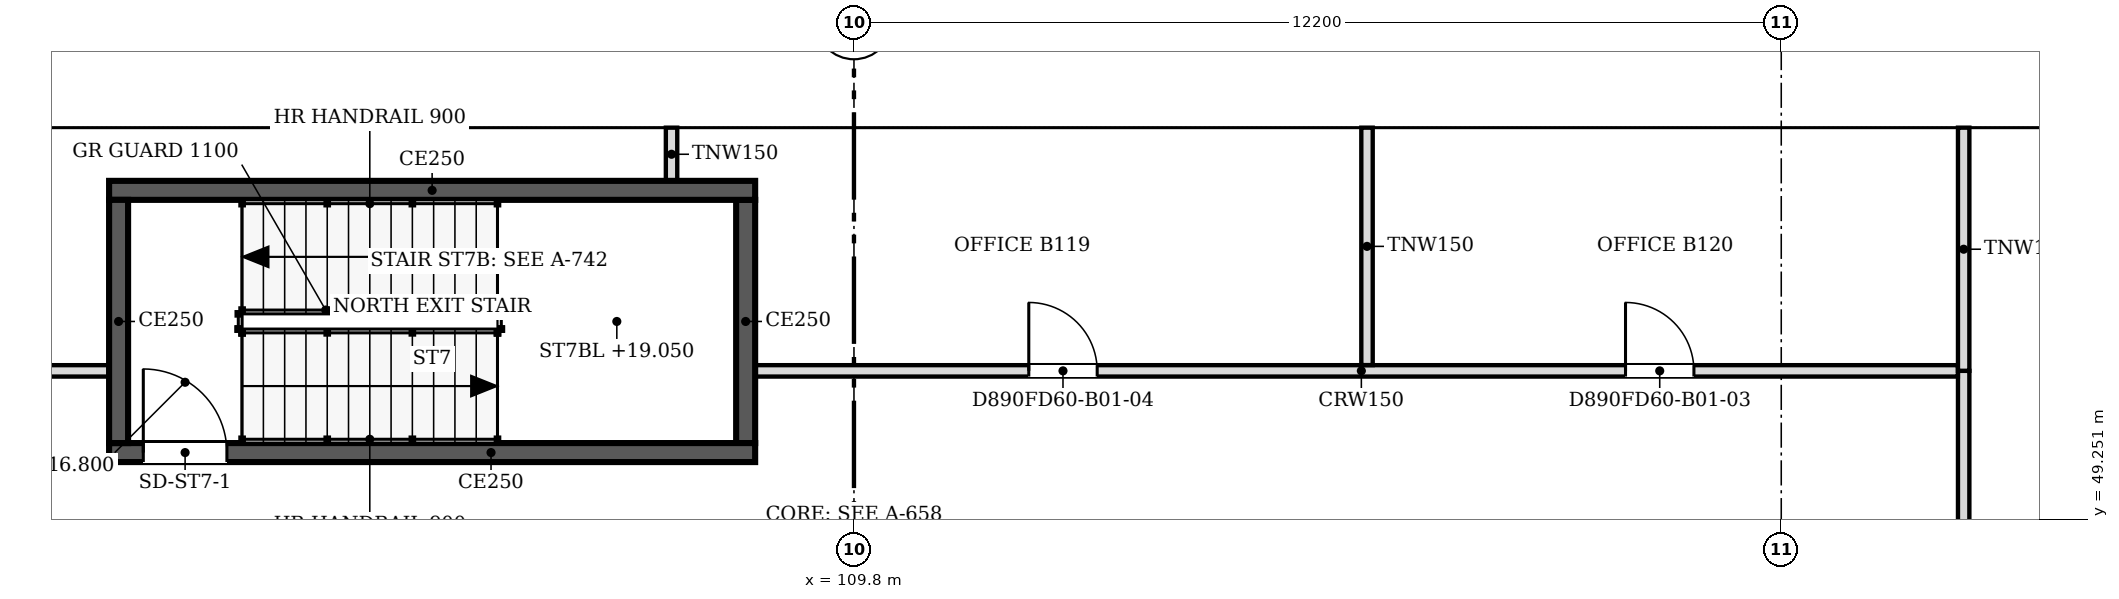
"""IFC4 building model, lengths in metres.
Left out: names, types, materials, properties, quantities, classifications, styles, units other than length and angle.
Written with IfcOpenShell. Run it as: python <this file> out.ifc"""

import sys

from ifc_helpers import new_model, si_unit, direction, frame, frame_2d, origin, place, context, subcontext, project, spatial, polyline, rectangle, outline, extrude, faceted_brep, source, transform, mapped, element, fill, save


model = new_model("IFC4")
c1 = context("Model", 3, precision=1e-05, world=origin(), true_north=direction((0.0, 1.0)))
c2 = subcontext(c1, "Body", "Model", "MODEL_VIEW")
j1 = project(units=[si_unit("LENGTHUNIT", "METRE"), si_unit("PLANEANGLEUNIT", "RADIAN")], contexts=[c1])
p1 = place(None, origin())
s1 = spatial("IfcSite", under=j1, at=p1, CompositionType="ELEMENT")
p2 = place(p1, origin())
s2 = spatial("IfcBuilding", under=s1, at=p2, CompositionType="ELEMENT")
p3 = place(p2, frame((0.0, 0.0, 16.8)))
s3 = spatial("IfcBuildingStorey", under=s2, at=p3, CompositionType="ELEMENT", Elevation=16.8)
m1 = source(origin(), c2, "Body", "Brep", [
    faceted_brep([(3.05, -0.25, 0.0), (0.047, -0.25, 4.5), (0.0, -0.25, 4.429), (0.0, -0.25, 0.0), (0.093, 0.25, 4.43), (3.05, 0.25, 0.0), (0.093, 0.25, 0.0), (0.047, 0.0, 4.5)], [[[0, 1, 2, 3]], [[4, 5, 6]], [[5, 4, 7, 1, 0]], [[2, 1, 7]], [[6, 5, 0, 3]], [[6, 3, 2, 7, 4]]]),
])
p4 = place(p3, frame((128.1, 54.65, 0.0), z_axis=(0.0, 0.0, 1.0), x_axis=(-1.0, 0.0, 0.0)))
e1 = element("IfcWall", 1, at=p4, inside=s3, PredefinedType="SOLIDWALL", context=c2, shape_type="MappedRepresentation", body=[
    mapped(m1, transform((0.0, 0.0, 0.0), scale=1.0)),
])
m2 = source(origin(), c2, "Body", "SweptSolid", [
    extrude(outline(polyline([(2.583, 0.25), (0.247, 3.75), (0.247, 0.25), (2.583, 0.25)])), frame((0.0, 0.26, 0.0), z_axis=(0.0, -1.0, 0.0), x_axis=(1.0, 0.0, 0.0)), (0.0, 0.0, 1.0), 0.52),
])
p5 = place(p4, origin())
e2 = element("IfcOpeningElement", 2, at=p5, cuts=e1, PredefinedType="OPENING", context=c2, shape_type="MappedRepresentation", body=[
    mapped(m2, transform((0.0, 0.0, 0.0), scale=1.0)),
])
m3 = source(origin(), c2, "Body", "SweptSolid", [
    extrude(outline(polyline([(6.1, 0.0), (3.05, 4.5), (0.0, 0.0), (6.1, 0.0)])), frame((0.0, 0.25, 0.0), z_axis=(0.0, -1.0, 0.0), x_axis=(1.0, 0.0, 0.0)), (0.0, 0.0, 1.0), 0.5),
])
p6 = place(p3, frame((125.05, 54.65, 0.0), z_axis=(0.0, 0.0, 1.0), x_axis=(-1.0, 0.0, 0.0)))
e3 = element("IfcWall", 3, at=p6, inside=s3, PredefinedType="SOLIDWALL", context=c2, shape_type="MappedRepresentation", body=[
    mapped(m3, transform((0.0, 0.0, 0.0), scale=1.0)),
])
m4 = source(origin(), c2, "Body", "SweptSolid", [
    extrude(outline(polyline([(5.629, 0.25), (3.05, 4.054), (0.471, 0.25), (5.629, 0.25)])), frame((0.0, 0.26, 0.0), z_axis=(0.0, -1.0, 0.0), x_axis=(1.0, 0.0, 0.0)), (0.0, 0.0, 1.0), 0.52),
])
p7 = place(p6, origin())
e4 = element("IfcOpeningElement", 4, at=p7, cuts=e3, PredefinedType="OPENING", context=c2, shape_type="MappedRepresentation", body=[
    mapped(m4, transform((0.0, 0.0, 0.0), scale=1.0)),
])
m5 = source(origin(), c2, "Body", "Brep", [
    faceted_brep([(6.1, -0.25, 0.0), (3.05, -0.25, 4.5), (0.0, -0.25, 0.0), (6.1, -0.25, 0.0), (0.0, 0.25, 0.0), (3.05, 0.25, 4.5), (6.1, 0.25, 0.0), (6.1, 0.25, 0.0)], [[[0, 1, 2, 3]], [[4, 5, 6, 7]], [[6, 5, 1, 0]], [[5, 4, 2, 1]], [[4, 7, 3, 2]], [[3, 7, 6, 0]]]),
])
p8 = place(p3, frame((118.95, 54.65, 0.0), z_axis=(0.0, 0.0, 1.0), x_axis=(-1.0, 0.0, 0.0)))
e5 = element("IfcWall", 5, at=p8, inside=s3, PredefinedType="SOLIDWALL", context=c2, shape_type="MappedRepresentation", body=[
    mapped(m5, transform((0.0, 0.0, 0.0), scale=1.0)),
])
p9 = place(p8, origin())
e6 = element("IfcOpeningElement", 6, at=p9, cuts=e5, PredefinedType="OPENING", context=c2, shape_type="MappedRepresentation", body=[
    mapped(m4, transform((0.0, 0.0, 0.0), scale=1.0)),
])
p10 = place(p3, frame((112.85, 54.65, 0.0), z_axis=(0.0, 0.0, 1.0), x_axis=(-1.0, 0.0, 0.0)))
e7 = element("IfcWall", 7, at=p10, inside=s3, PredefinedType="SOLIDWALL", context=c2, shape_type="MappedRepresentation", body=[
    mapped(m3, transform((0.0, 0.0, 0.0), scale=1.0)),
])
p11 = place(p10, origin())
e8 = element("IfcOpeningElement", 8, at=p11, cuts=e7, PredefinedType="OPENING", context=c2, shape_type="MappedRepresentation", body=[
    mapped(m4, transform((0.0, 0.0, 0.0), scale=1.0)),
])
p12 = place(p3, frame((106.75, 54.65, 0.0), z_axis=(0.0, 0.0, 1.0), x_axis=(-1.0, 0.0, 0.0)))
e9 = element("IfcWall", 9, at=p12, inside=s3, PredefinedType="SOLIDWALL", context=c2, shape_type="MappedRepresentation", body=[
    mapped(m3, transform((0.0, 0.0, 0.0), scale=1.0)),
])
p13 = place(p12, origin())
e10 = element("IfcOpeningElement", 10, at=p13, cuts=e9, PredefinedType="OPENING", context=c2, shape_type="MappedRepresentation", body=[
    mapped(m4, transform((0.0, 0.0, 0.0), scale=1.0)),
])
p14 = place(p3, frame((100.65, 54.65, 0.0), z_axis=(0.0, 0.0, 1.0), x_axis=(-1.0, 0.0, 0.0)))
e11 = element("IfcWall", 11, at=p14, inside=s3, PredefinedType="SOLIDWALL", context=c2, shape_type="MappedRepresentation", body=[
    mapped(m5, transform((0.0, 0.0, 0.0), scale=1.0)),
])
p15 = place(p14, origin())
e12 = element("IfcOpeningElement", 12, at=p15, cuts=e11, PredefinedType="OPENING", context=c2, shape_type="MappedRepresentation", body=[
    mapped(m4, transform((0.0, 0.0, 0.0), scale=1.0)),
])
p16 = place(p2, frame((0.0, 0.0, 21.3)))
s4 = spatial("IfcBuildingStorey", under=s2, at=p16, CompositionType="ELEMENT", Elevation=21.3)
m6 = source(origin(), c2, "Body", "Brep", [
    faceted_brep([(3.003, -0.25, 0.0), (6.053, -0.25, 4.5), (3.003, -0.25, 9.0), (0.0, -0.25, 4.5), (0.047, 0.25, 4.57), (3.003, 0.25, 9.0), (6.053, 0.25, 4.5), (3.003, 0.25, 0.0), (0.047, 0.25, 4.43), (0.0, 0.0, 4.5)], [[[0, 1, 2, 3]], [[4, 5, 6, 7, 8]], [[7, 6, 1, 0]], [[6, 5, 2, 1]], [[5, 4, 9, 3, 2]], [[8, 7, 0, 3, 9]], [[8, 9, 4]]]),
])
p17 = place(p16, frame((128.053, 54.65, -4.5), z_axis=(0.0, 0.0, 1.0), x_axis=(-1.0, 0.0, 0.0)))
e13 = element("IfcWall", 13, at=p17, inside=s4, PredefinedType="SOLIDWALL", context=c2, shape_type="MappedRepresentation", body=[
    mapped(m6, transform((0.0, 0.0, 0.0), scale=1.0)),
])
m7 = source(origin(), c2, "Body", "SweptSolid", [
    extrude(outline(polyline([(3.005, 0.448), (5.751, 4.5), (3.005, 8.552), (0.301, 4.5), (3.005, 0.448)])), frame((0.0, 0.26, 0.0), z_axis=(0.0, -1.0, 0.0), x_axis=(1.0, 0.0, 0.0)), (0.0, 0.0, 1.0), 0.52),
])
p18 = place(p17, origin())
e14 = element("IfcOpeningElement", 14, at=p18, cuts=e13, PredefinedType="OPENING", context=c2, shape_type="MappedRepresentation", body=[
    mapped(m7, transform((0.0, 0.0, 0.0), scale=1.0)),
])
m8 = source(origin(), c2, "Body", "SweptSolid", [
    extrude(outline(polyline([(3.05, 0.0), (6.1, 4.5), (3.05, 9.0), (0.0, 4.5), (3.05, 0.0)])), frame((0.0, 0.25, 0.0), z_axis=(0.0, -1.0, 0.0), x_axis=(1.0, 0.0, 0.0)), (0.0, 0.0, 1.0), 0.5),
])
p19 = place(p16, frame((122.0, 54.65, -4.5), z_axis=(0.0, 0.0, 1.0), x_axis=(-1.0, 0.0, 0.0)))
e15 = element("IfcWall", 15, at=p19, inside=s4, PredefinedType="SOLIDWALL", context=c2, shape_type="MappedRepresentation", body=[
    mapped(m8, transform((0.0, 0.0, 0.0), scale=1.0)),
])
m9 = source(origin(), c2, "Body", "SweptSolid", [
    extrude(outline(polyline([(3.05, 0.446), (5.798, 4.5), (3.05, 8.554), (0.302, 4.5), (3.05, 0.446)])), frame((0.0, 0.26, 0.0), z_axis=(0.0, -1.0, 0.0), x_axis=(1.0, 0.0, 0.0)), (0.0, 0.0, 1.0), 0.52),
])
p20 = place(p19, origin())
e16 = element("IfcOpeningElement", 16, at=p20, cuts=e15, PredefinedType="OPENING", context=c2, shape_type="MappedRepresentation", body=[
    mapped(m9, transform((0.0, 0.0, 0.0), scale=1.0)),
])
m10 = source(origin(), c2, "Body", "Brep", [
    faceted_brep([(3.05, -0.25, 0.0), (6.1, -0.25, 4.5), (6.1, -0.25, 4.5), (3.05, -0.25, 9.0), (0.0, -0.25, 4.5), (0.0, 0.25, 4.5), (3.05, 0.25, 9.0), (6.1, 0.25, 4.5), (6.1, 0.25, 4.5), (3.05, 0.25, 0.0)], [[[0, 1, 2, 3, 4]], [[5, 6, 7, 8, 9]], [[9, 8, 1, 0]], [[7, 6, 3, 2]], [[6, 5, 4, 3]], [[5, 9, 0, 4]], [[1, 8, 7, 2]]]),
])
p21 = place(p16, frame((115.9, 54.65, -4.5), z_axis=(0.0, 0.0, 1.0), x_axis=(-1.0, 0.0, 0.0)))
e17 = element("IfcWall", 17, at=p21, inside=s4, PredefinedType="SOLIDWALL", context=c2, shape_type="MappedRepresentation", body=[
    mapped(m10, transform((0.0, 0.0, 0.0), scale=1.0)),
])
p22 = place(p21, origin())
e18 = element("IfcOpeningElement", 18, at=p22, cuts=e17, PredefinedType="OPENING", context=c2, shape_type="MappedRepresentation", body=[
    mapped(m9, transform((0.0, 0.0, 0.0), scale=1.0)),
])
p23 = place(p16, frame((109.8, 54.65, -4.5), z_axis=(0.0, 0.0, 1.0), x_axis=(-1.0, 0.0, 0.0)))
e19 = element("IfcWall", 19, at=p23, inside=s4, PredefinedType="SOLIDWALL", context=c2, shape_type="MappedRepresentation", body=[
    mapped(m8, transform((0.0, 0.0, 0.0), scale=1.0)),
])
p24 = place(p23, origin())
e20 = element("IfcOpeningElement", 20, at=p24, cuts=e19, PredefinedType="OPENING", context=c2, shape_type="MappedRepresentation", body=[
    mapped(m9, transform((0.0, 0.0, 0.0), scale=1.0)),
])
p25 = place(p16, frame((103.7, 54.65, -4.5), z_axis=(0.0, 0.0, 1.0), x_axis=(-1.0, 0.0, 0.0)))
e21 = element("IfcWall", 21, at=p25, inside=s4, PredefinedType="SOLIDWALL", context=c2, shape_type="MappedRepresentation", body=[
    mapped(m10, transform((0.0, 0.0, 0.0), scale=1.0)),
])
p26 = place(p25, origin())
e22 = element("IfcOpeningElement", 22, at=p26, cuts=e21, PredefinedType="OPENING", context=c2, shape_type="MappedRepresentation", body=[
    mapped(m9, transform((0.0, 0.0, 0.0), scale=1.0)),
])
p27 = place(p3, frame((108.5, 50.125, 0.0), z_axis=(0.0, 0.0, 1.0), x_axis=(-1.0, 0.0, 0.0)))
e23 = element("IfcWall", 23, at=p27, inside=s3, PredefinedType="SOLIDWALL", context=c2, shape_type="SweptSolid", body=[
    extrude(rectangle(XDim=8.5, YDim=0.25, at=frame_2d((4.25, 0.0))), origin(), (0.0, 0.0, 1.0), 4.5),
])
m11 = source(origin(), c2, "Body", "SweptSolid", [
    extrude(rectangle(XDim=1.1, YDim=2.1, at=frame_2d((0.55, 1.05))), frame((0.0, 0.135, 0.0), z_axis=(0.0, -1.0, 0.0), x_axis=(1.0, 0.0, 0.0)), (0.0, 0.0, 1.0), 0.27),
])
p28 = place(p27, frame((6.95, 0.0, 0.0)))
e24 = element("IfcOpeningElement", 24, at=p28, cuts=e23, PredefinedType="OPENING", context=c2, shape_type="MappedRepresentation", body=[
    mapped(m11, transform((0.0, 0.0, 0.0), scale=1.0)),
])
p29 = place(p3, frame((100.125, 50.25, 0.0), z_axis=(0.0, 0.0, 1.0), x_axis=(0.0, 1.0, 0.0)))
e25 = element("IfcWall", 25, at=p29, inside=s3, PredefinedType="SOLIDWALL", context=c2, shape_type="SweptSolid", body=[
    extrude(rectangle(XDim=3.2, YDim=0.25, at=frame_2d((1.6, 0.0))), origin(), (0.0, 0.0, 1.0), 4.5),
])
p30 = place(p3, frame((100.0, 53.575, 0.0), z_axis=(0.0, 0.0, 1.0), x_axis=(1.0, 0.0, 0.0)))
e26 = element("IfcWall", 26, at=p30, inside=s3, PredefinedType="SOLIDWALL", context=c2, shape_type="SweptSolid", body=[
    extrude(rectangle(XDim=8.5, YDim=0.25, at=frame_2d((4.25, 0.0))), origin(), (0.0, 0.0, 1.0), 4.5),
])
p31 = place(p3, frame((108.375, 53.45, 0.0), z_axis=(0.0, 0.0, 1.0), x_axis=(0.0, -1.0, 0.0)))
e27 = element("IfcWall", 27, at=p31, inside=s3, PredefinedType="SOLIDWALL", context=c2, shape_type="SweptSolid", body=[
    extrude(rectangle(XDim=3.2, YDim=0.25, at=frame_2d((1.6, 0.0))), origin(), (0.0, 0.0, 1.0), 4.5),
])
p32 = place(p3, frame((124.4, 51.2, 0.0), z_axis=(0.0, 0.0, 1.0), x_axis=(0.0, -1.0, 0.0)))
e28 = element("IfcWall", 28, at=p32, inside=s3, PredefinedType="PARTITIONING", context=c2, shape_type="SweptSolid", body=[
    extrude(rectangle(XDim=14.6, YDim=0.15, at=frame_2d((7.3, 0.0))), origin(), (0.0, 0.0, 1.0), 3.415),
])
m12 = source(origin(), c2, "Body", "SweptSolid", [
    extrude(rectangle(XDim=0.9, YDim=2.1, at=frame_2d((0.45, 1.05))), frame((0.0, 0.085, 0.0), z_axis=(0.0, -1.0, 0.0), x_axis=(1.0, 0.0, 0.0)), (0.0, 0.0, 1.0), 0.17),
])
p33 = place(p32, frame((3.9, 0.0, 0.0)))
e29 = element("IfcOpeningElement", 29, at=p33, cuts=e28, PredefinedType="OPENING", context=c2, shape_type="MappedRepresentation", body=[
    mapped(m12, transform((0.0, 0.0, 0.0), scale=1.0)),
])
p34 = place(p3, frame((95.276, 51.2, 0.0), z_axis=(0.0, 0.0, 1.0), x_axis=(1.0, 0.0, 0.0)))
e30 = element("IfcWall", 30, at=p34, inside=s3, PredefinedType="PARTITIONING", context=c2, shape_type="SweptSolid", body=[
    extrude(rectangle(XDim=4.724, YDim=0.15, at=frame_2d((2.362, 0.0))), origin(), (0.0, 0.0, 1.0), 3.415),
])
m13 = source(origin(), c2, "Body", "SweptSolid", [
    extrude(rectangle(XDim=1.0, YDim=2.1, at=frame_2d((0.5, 1.05))), frame((0.0, 0.085, 0.0), z_axis=(0.0, -1.0, 0.0), x_axis=(1.0, 0.0, 0.0)), (0.0, 0.0, 1.0), 0.17),
])
p35 = place(p34, frame((1.9, 0.0, 0.0)))
e31 = element("IfcOpeningElement", 31, at=p35, cuts=e30, PredefinedType="OPENING", context=c2, shape_type="MappedRepresentation", body=[
    mapped(m13, transform((0.0, 0.0, 0.0), scale=1.0)),
])
p36 = place(p3, frame((108.5, 51.2, 0.0), z_axis=(0.0, 0.0, 1.0), x_axis=(1.0, 0.0, 0.0)))
e32 = element("IfcWall", 32, at=p36, inside=s3, PredefinedType="PARTITIONING", context=c2, shape_type="SweptSolid", body=[
    extrude(rectangle(XDim=15.824, YDim=0.15, at=frame_2d((7.912, 0.0))), origin(), (0.0, 0.0, 1.0), 3.415),
])
p37 = place(p36, frame((11.451, 0.0, 0.0)))
e33 = element("IfcOpeningElement", 33, at=p37, cuts=e32, PredefinedType="OPENING", context=c2, shape_type="MappedRepresentation", body=[
    mapped(m12, transform((0.0, 0.0, 0.0), scale=1.0)),
])
p38 = place(p36, frame((3.6, 0.0, 0.0)))
e34 = element("IfcOpeningElement", 34, at=p38, cuts=e32, PredefinedType="OPENING", context=c2, shape_type="MappedRepresentation", body=[
    mapped(m12, transform((0.0, 0.0, 0.0), scale=1.0)),
])
p39 = place(p3, frame((124.4, 51.201, 0.0), z_axis=(0.0, 0.0, 1.0), x_axis=(0.0, 1.0, 0.0)))
e35 = element("IfcWall", 35, at=p39, inside=s3, PredefinedType="PARTITIONING", context=c2, shape_type="SweptSolid", body=[
    extrude(rectangle(XDim=3.199, YDim=0.15, at=frame_2d((1.6, 0.0))), origin(), (0.0, 0.0, 1.0), 3.415),
])
p40 = place(p3, frame((116.55, 51.276, 0.0), z_axis=(0.0, 0.0, 1.0), x_axis=(0.0, 1.0, 0.0)))
e36 = element("IfcWall", 36, at=p40, inside=s3, PredefinedType="PARTITIONING", context=c2, shape_type="SweptSolid", body=[
    extrude(rectangle(XDim=3.124, YDim=0.15, at=frame_2d((1.562, 0.0))), origin(), (0.0, 0.0, 1.0), 3.415),
])
p41 = place(p3, frame((107.4, 53.7, 0.0), z_axis=(0.0, 0.0, 1.0), x_axis=(0.0, 1.0, 0.0)))
e37 = element("IfcWall", 37, at=p41, inside=s3, PredefinedType="PARTITIONING", context=c2, shape_type="SweptSolid", body=[
    extrude(rectangle(XDim=0.7, YDim=0.15, at=frame_2d((0.35, 0.0))), origin(), (0.0, 0.0, 1.0), 3.415),
])
m14 = source(origin(), c2, "Body", "SweptSolid", [
    extrude(rectangle(XDim=1.1, YDim=2.1, at=frame_2d((0.55, 1.05))), frame((0.0, 0.025, 0.0), z_axis=(0.0, -1.0, 0.0), x_axis=(1.0, 0.0, 0.0)), (0.0, 0.0, 1.0), 0.05),
])
p42 = place(p28, origin())
e38 = element("IfcDoor", 38, at=p42, inside=s3, OperationType="SINGLE_SWING_RIGHT", PredefinedType="DOOR", context=c2, shape_type="MappedRepresentation", body=[
    mapped(m14, transform((0.0, 0.0, 0.0), scale=1.0)),
])
fill(e24, e38)
m15 = source(origin(), c2, "Body", "SweptSolid", [
    extrude(rectangle(XDim=0.9, YDim=2.1, at=frame_2d((0.45, 1.05))), frame((0.0, 0.025, 0.0), z_axis=(0.0, -1.0, 0.0), x_axis=(1.0, 0.0, 0.0)), (0.0, 0.0, 1.0), 0.05),
])
p43 = place(p37, origin())
e39 = element("IfcDoor", 39, at=p43, inside=s3, OperationType="SINGLE_SWING_LEFT", PredefinedType="DOOR", context=c2, shape_type="MappedRepresentation", body=[
    mapped(m15, transform((0.0, 0.0, 0.0), scale=1.0)),
])
fill(e33, e39)
p44 = place(p38, origin())
e40 = element("IfcDoor", 40, at=p44, inside=s3, OperationType="SINGLE_SWING_LEFT", PredefinedType="DOOR", context=c2, shape_type="MappedRepresentation", body=[
    mapped(m15, transform((0.0, 0.0, 0.0), scale=1.0)),
])
fill(e34, e40)
save(model, sys.argv[1])
